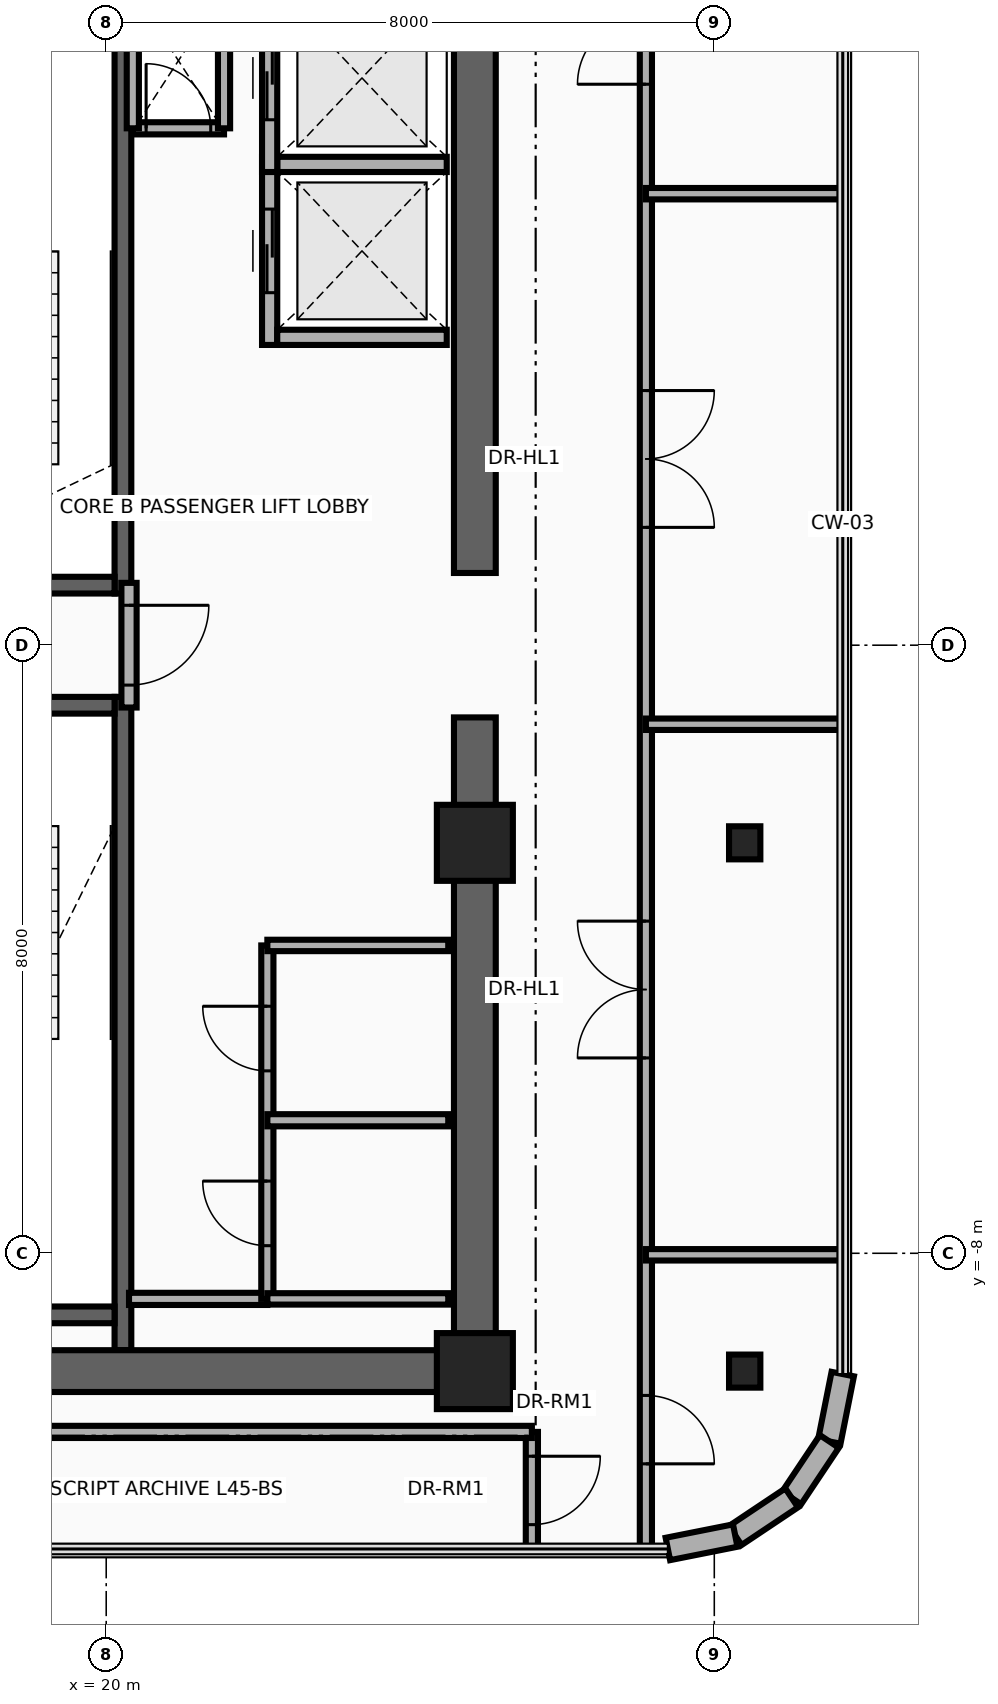
"""IFC4 building model, lengths in metres.
Left out: names, types, materials, properties, quantities, classifications, styles, units other than length and angle.
Written with IfcOpenShell. Run it as: python <this file> out.ifc"""

import sys

from ifc_helpers import new_model, si_unit, direction, frame, frame_2d, origin, origin_2d, place, context, subcontext, project, spatial, rectangle, i_section, extrude, source, transform, mapped, element, fill, save


model = new_model("IFC4")
c1 = context("Model", 3, precision=1e-05, world=origin(), true_north=direction((0.0, 1.0)))
c2 = subcontext(c1, "Body", "Model", "MODEL_VIEW")
j1 = project(units=[si_unit("LENGTHUNIT", "METRE"), si_unit("PLANEANGLEUNIT", "RADIAN")], contexts=[c1])
p1 = place(None, origin())
s1 = spatial("IfcSite", under=j1, at=p1, CompositionType="ELEMENT")
p2 = place(p1, origin())
s2 = spatial("IfcBuilding", under=s1, at=p2, CompositionType="ELEMENT")
p3 = place(p2, frame((0.0, 0.0, 176.55)))
s3 = spatial("IfcBuildingStorey", under=s2, at=p3, CompositionType="ELEMENT", Elevation=176.55)
p4 = place(p3, frame((20.22, 0.68, 0.0), z_axis=(0.0, 0.0, 1.0), x_axis=(0.0, 1.0, 0.0)))
e1 = element("IfcWall", 1, at=p4, inside=s3, PredefinedType="SHEAR", context=c2, shape_type="SweptSolid", body=[
    extrude(rectangle(XDim=8.595, YDim=0.22, at=frame_2d((4.297, 0.0))), origin(), (0.0, 0.0, 1.0), 3.63),
])
p5 = place(p3, frame((17.0, 0.79, 0.0), z_axis=(0.0, 0.0, 1.0), x_axis=(1.0, 0.0, 0.0)))
e2 = element("IfcWall", 2, at=p5, inside=s3, PredefinedType="SHEAR", context=c2, shape_type="SweptSolid", body=[
    extrude(rectangle(XDim=3.11, YDim=0.22, at=frame_2d((1.555, 0.0))), origin(), (0.0, 0.0, 1.0), 3.63),
])
p6 = place(p5, frame((0.95, 0.0, 0.0)))
e3 = element("IfcOpeningElement", 3, at=p6, cuts=e2, PredefinedType="OPENING", context=c2, shape_type="SweptSolid", body=[
    extrude(rectangle(XDim=1.1, YDim=2.15, at=frame_2d((0.55, 1.075))), frame((0.0, 0.125, 0.0), z_axis=(0.0, -1.0, 0.0), x_axis=(1.0, 0.0, 0.0)), (0.0, 0.0, 1.0), 0.25),
])
p7 = place(p3, frame((20.22, -9.275, 0.0), z_axis=(0.0, 0.0, 1.0), x_axis=(0.0, 1.0, 0.0)))
e4 = element("IfcWall", 4, at=p7, inside=s3, PredefinedType="SHEAR", context=c2, shape_type="SweptSolid", body=[
    extrude(rectangle(XDim=8.595, YDim=0.22, at=frame_2d((4.297, 0.0))), origin(), (0.0, 0.0, 1.0), 3.63),
])
p8 = place(p3, frame((17.0, -8.81, 0.0), z_axis=(0.0, 0.0, 1.0), x_axis=(1.0, 0.0, 0.0)))
e5 = element("IfcWall", 5, at=p8, inside=s3, PredefinedType="SHEAR", context=c2, shape_type="SweptSolid", body=[
    extrude(rectangle(XDim=3.11, YDim=0.22, at=frame_2d((1.555, 0.0))), origin(), (0.0, 0.0, 1.0), 3.63),
])
p9 = place(p3, frame((17.0, -0.79, 0.0), z_axis=(0.0, 0.0, 1.0), x_axis=(1.0, 0.0, 0.0)))
e6 = element("IfcWall", 6, at=p9, inside=s3, PredefinedType="SHEAR", context=c2, shape_type="SweptSolid", body=[
    extrude(rectangle(XDim=3.11, YDim=0.22, at=frame_2d((1.555, 0.0))), origin(), (0.0, 0.0, 1.0), 3.63),
])
p10 = place(p9, frame((0.95, 0.0, 0.0)))
e7 = element("IfcOpeningElement", 7, at=p10, cuts=e6, PredefinedType="OPENING", context=c2, shape_type="SweptSolid", body=[
    extrude(rectangle(XDim=1.1, YDim=2.15, at=frame_2d((0.55, 1.075))), frame((0.0, 0.125, 0.0), z_axis=(0.0, -1.0, 0.0), x_axis=(1.0, 0.0, 0.0)), (0.0, 0.0, 1.0), 0.25),
])
for number, where, z_axis, x_axis in (
    (8, (24.85, -9.825, 0.0), (0.0, 0.0, 1.0), (0.0, 1.0, 0.0)),
    (9, (24.85, 0.95, 0.0), (0.0, 0.0, 1.0), (0.0, 1.0, 0.0)),
):
    element("IfcWall", number, at=place(p3, frame(where, z_axis=z_axis, x_axis=x_axis)), inside=s3, PredefinedType="SHEAR", context=c2, shape_type="SweptSolid", body=[
        extrude(rectangle(XDim=8.875, YDim=0.55, at=frame_2d((4.438, 0.0))), origin(), (0.0, 0.0, 1.0), 3.63),
    ])
p11 = place(p3, frame((15.85, -9.55, 0.0), z_axis=(0.0, 0.0, 1.0), x_axis=(1.0, 0.0, 0.0)))
e10 = element("IfcWall", 10, at=p11, inside=s3, PredefinedType="SHEAR", context=c2, shape_type="SweptSolid", body=[
    extrude(rectangle(XDim=9.0, YDim=0.55, at=frame_2d((4.5, 0.0))), origin(), (0.0, 0.0, 1.0), 3.63),
])
m1 = source(origin(), c2, "Body", "SweptSolid", [
    extrude(rectangle(XDim=1.0, YDim=1.0, at=origin_2d()), origin(), (0.0, 0.0, 1.0), 3.95),
])
p12 = place(p3, frame((24.85, -9.55, 0.0), z_axis=(0.0, 0.0, 1.0), x_axis=(1.0, 0.0, 0.0)))
e11 = element("IfcColumn", 11, at=p12, inside=s3, PredefinedType="COLUMN", context=c2, shape_type="MappedRepresentation", body=[
    mapped(m1, transform((0.0, 0.0, 0.0), x_axis=(1.0, 0.0, 0.0), y_axis=(0.0, 1.0, 0.0), z_axis=(0.0, 0.0, 1.0), scale=1.0)),
])
m2 = source(origin(), c2, "Body", "SweptSolid", [
    extrude(i_section(OverallWidth=0.412, OverallDepth=0.435, WebThickness=0.036, FlangeThickness=0.057, at=origin_2d()), origin(), (0.0, 0.0, 1.0), 3.95),
])
p13 = place(p3, frame((28.4, -9.55, 0.0), z_axis=(0.0, 0.0, 1.0), x_axis=(1.0, 0.0, 0.0)))
e12 = element("IfcColumn", 12, at=p13, inside=s3, PredefinedType="COLUMN", context=c2, shape_type="MappedRepresentation", body=[
    mapped(m2, transform((0.0, 0.0, 0.0), x_axis=(1.0, 0.0, 0.0), y_axis=(0.0, 1.0, 0.0), z_axis=(0.0, 0.0, 1.0), scale=1.0)),
])
p14 = place(p3, frame((24.85, -2.6, 0.0), z_axis=(0.0, 0.0, 1.0), x_axis=(1.0, 0.0, 0.0)))
e13 = element("IfcColumn", 13, at=p14, inside=s3, PredefinedType="COLUMN", context=c2, shape_type="MappedRepresentation", body=[
    mapped(m1, transform((0.0, 0.0, 0.0), x_axis=(1.0, 0.0, 0.0), y_axis=(0.0, 1.0, 0.0), z_axis=(0.0, 0.0, 1.0), scale=1.0)),
])
p15 = place(p3, frame((28.4, -2.6, 0.0), z_axis=(0.0, 0.0, 1.0), x_axis=(1.0, 0.0, 0.0)))
e14 = element("IfcColumn", 14, at=p15, inside=s3, PredefinedType="COLUMN", context=c2, shape_type="MappedRepresentation", body=[
    mapped(m2, transform((0.0, 0.0, 0.0), x_axis=(1.0, 0.0, 0.0), y_axis=(0.0, 1.0, 0.0), z_axis=(0.0, 0.0, 1.0), scale=1.0)),
])
p16 = place(p3, frame((29.69, -9.589, 0.0), z_axis=(0.0, 0.0, 1.0), x_axis=(-0.195025152871, -0.980798241101, 0.0)))
e15 = element("IfcWall", 15, at=p16, inside=s3, PredefinedType="SOLIDWALL", context=c2, shape_type="SweptSolid", body=[
    extrude(rectangle(XDim=0.904, YDim=0.3, at=frame_2d((0.452, 0.0))), origin(), (0.0, 0.0, 1.0), 3.63),
])
p17 = place(p3, frame((29.514, -10.476, 0.0), z_axis=(0.0, 0.0, 1.0), x_axis=(-0.555520488502, -0.831502848374, 0.0)))
e16 = element("IfcWall", 16, at=p17, inside=s3, PredefinedType="SOLIDWALL", context=c2, shape_type="SweptSolid", body=[
    extrude(rectangle(XDim=0.893, YDim=0.3, at=frame_2d((0.446, 0.0))), origin(), (0.0, 0.0, 1.0), 3.63),
])
p18 = place(p3, frame((29.018, -11.218, 0.0), z_axis=(0.0, 0.0, 1.0), x_axis=(-0.83158722889, -0.555394167009, 0.0)))
e17 = element("IfcWall", 17, at=p18, inside=s3, PredefinedType="SOLIDWALL", context=c2, shape_type="SweptSolid", body=[
    extrude(rectangle(XDim=0.893, YDim=0.3, at=frame_2d((0.446, 0.0))), origin(), (0.0, 0.0, 1.0), 3.63),
])
p19 = place(p3, frame((28.275, -11.714, 0.0), z_axis=(0.0, 0.0, 1.0), x_axis=(-0.980787963133, -0.19507683454, 0.0)))
e18 = element("IfcWall", 18, at=p19, inside=s3, PredefinedType="SOLIDWALL", context=c2, shape_type="SweptSolid", body=[
    extrude(rectangle(XDim=0.904, YDim=0.3, at=frame_2d((0.452, 0.0))), origin(), (0.0, 0.0, 1.0), 3.63),
])
p20 = place(p3, frame((22.15, 3.95, 0.0), z_axis=(0.0, 0.0, 1.0), x_axis=(0.0, 1.0, 0.0)))
e19 = element("IfcWall", 19, at=p20, inside=s3, PredefinedType="MOVABLE", context=c2, shape_type="SweptSolid", body=[
    extrude(rectangle(XDim=2.475, YDim=0.2, at=frame_2d((1.238, 0.0))), origin(), (0.0, 0.0, 1.0), 3.63),
])
p21 = place(p20, frame((0.688, 0.0, 0.0)))
e20 = element("IfcOpeningElement", 20, at=p21, cuts=e19, PredefinedType="OPENING", context=c2, shape_type="SweptSolid", body=[
    extrude(rectangle(XDim=1.1, YDim=2.1, at=frame_2d((0.55, 1.05))), frame((0.0, 0.115, 0.0), z_axis=(0.0, -1.0, 0.0), x_axis=(1.0, 0.0, 0.0)), (0.0, 0.0, 1.0), 0.23),
])
for number, where, z_axis, x_axis in (
    (21, (22.25, 4.05, 0.0), (0.0, 0.0, 1.0), (1.0, 0.0, 0.0)),
    (22, (22.25, 6.325, 0.0), (0.0, 0.0, 1.0), (1.0, 0.0, 0.0)),
):
    element("IfcWall", number, at=place(p3, frame(where, z_axis=z_axis, x_axis=x_axis)), inside=s3, PredefinedType="MOVABLE", context=c2, shape_type="SweptSolid", body=[
        extrude(rectangle(XDim=2.23, YDim=0.2, at=frame_2d((1.115, 0.0))), origin(), (0.0, 0.0, 1.0), 3.63),
    ])
p22 = place(p3, frame((22.15, 6.225, 0.0), z_axis=(0.0, 0.0, 1.0), x_axis=(0.0, 1.0, 0.0)))
e23 = element("IfcWall", 23, at=p22, inside=s3, PredefinedType="MOVABLE", context=c2, shape_type="SweptSolid", body=[
    extrude(rectangle(XDim=2.475, YDim=0.2, at=frame_2d((1.237, 0.0))), origin(), (0.0, 0.0, 1.0), 3.63),
])
p23 = place(p22, frame((0.688, 0.0, 0.0)))
e24 = element("IfcOpeningElement", 24, at=p23, cuts=e23, PredefinedType="OPENING", context=c2, shape_type="SweptSolid", body=[
    extrude(rectangle(XDim=1.1, YDim=2.1, at=frame_2d((0.55, 1.05))), frame((0.0, 0.115, 0.0), z_axis=(0.0, -1.0, 0.0), x_axis=(1.0, 0.0, 0.0)), (0.0, 0.0, 1.0), 0.23),
])
p24 = place(p3, frame((20.3, -0.82, 0.0), z_axis=(0.0, 0.0, 1.0), x_axis=(0.0, 1.0, 0.0)))
e25 = element("IfcWall", 25, at=p24, inside=s3, PredefinedType="PARTITIONING", context=c2, shape_type="SweptSolid", body=[
    extrude(rectangle(XDim=1.64, YDim=0.2, at=frame_2d((0.82, 0.0))), origin(), (0.0, 0.0, 1.0), 3.63),
])
p25 = place(p24, frame((0.295, 0.0, 0.0)))
e26 = element("IfcOpeningElement", 26, at=p25, cuts=e25, PredefinedType="OPENING", context=c2, shape_type="SweptSolid", body=[
    extrude(rectangle(XDim=1.05, YDim=2.15, at=frame_2d((0.525, 1.075))), frame((0.0, 0.115, 0.0), z_axis=(0.0, -1.0, 0.0), x_axis=(1.0, 0.0, 0.0)), (0.0, 0.0, 1.0), 0.23),
])
p26 = place(p3, frame((20.35, 6.8, 0.0), z_axis=(0.0, 0.0, 1.0), x_axis=(1.0, 0.0, 0.0)))
e27 = element("IfcWall", 27, at=p26, inside=s3, PredefinedType="PARTITIONING", context=c2, shape_type="SweptSolid", body=[
    extrude(rectangle(XDim=1.2, YDim=0.16, at=frame_2d((0.6, 0.0))), origin(), (0.0, 0.0, 1.0), 3.63),
])
p27 = place(p26, frame((0.175, 0.0, 0.0)))
e28 = element("IfcOpeningElement", 28, at=p27, cuts=e27, PredefinedType="OPENING", context=c2, shape_type="SweptSolid", body=[
    extrude(rectangle(XDim=0.85, YDim=2.05, at=frame_2d((0.425, 1.025))), frame((0.0, 0.095, 0.0), z_axis=(0.0, -1.0, 0.0), x_axis=(1.0, 0.0, 0.0)), (0.0, 0.0, 1.0), 0.19),
])
for number, where, z_axis, x_axis in (
    (29, (21.55, 6.8, 0.0), (0.0, 0.0, 1.0), (0.0, 1.0, 0.0)),
    (30, (20.35, 6.8, 0.0), (0.0, 0.0, 1.0), (0.0, 1.0, 0.0)),
):
    element("IfcWall", number, at=place(p3, frame(where, z_axis=z_axis, x_axis=x_axis)), inside=s3, PredefinedType="PARTITIONING", context=c2, shape_type="SweptSolid", body=[
        extrude(rectangle(XDim=1.8, YDim=0.16, at=frame_2d((0.9, 0.0))), origin(), (0.0, 0.0, 1.0), 3.63),
    ])
p28 = place(p3, frame((20.3, -8.6, 0.0), z_axis=(0.0, 0.0, 1.0), x_axis=(1.0, 0.0, 0.0)))
e31 = element("IfcWall", 31, at=p28, inside=s3, PredefinedType="PARTITIONING", context=c2, shape_type="SweptSolid", body=[
    extrude(rectangle(XDim=1.82, YDim=0.16, at=frame_2d((0.91, 0.0))), origin(), (0.0, 0.0, 1.0), 3.63),
])
p29 = place(p3, frame((22.12, -8.6, 0.0), z_axis=(0.0, 0.0, 1.0), x_axis=(0.0, 1.0, 0.0)))
e32 = element("IfcWall", 32, at=p29, inside=s3, PredefinedType="PARTITIONING", context=c2, shape_type="SweptSolid", body=[
    extrude(rectangle(XDim=4.65, YDim=0.16, at=frame_2d((2.325, 0.0))), origin(), (0.0, 0.0, 1.0), 3.63),
])
p30 = place(p29, frame((0.7, 0.0, 0.0)))
e33 = element("IfcOpeningElement", 33, at=p30, cuts=e32, PredefinedType="OPENING", context=c2, shape_type="SweptSolid", body=[
    extrude(rectangle(XDim=0.85, YDim=2.05, at=frame_2d((0.425, 1.025))), frame((0.0, 0.095, 0.0), z_axis=(0.0, -1.0, 0.0), x_axis=(1.0, 0.0, 0.0)), (0.0, 0.0, 1.0), 0.19),
])
p31 = place(p29, frame((3.0, 0.0, 0.0)))
e34 = element("IfcOpeningElement", 34, at=p31, cuts=e32, PredefinedType="OPENING", context=c2, shape_type="SweptSolid", body=[
    extrude(rectangle(XDim=0.85, YDim=2.05, at=frame_2d((0.425, 1.025))), frame((0.0, 0.095, 0.0), z_axis=(0.0, -1.0, 0.0), x_axis=(1.0, 0.0, 0.0)), (0.0, 0.0, 1.0), 0.19),
])
for number, where, z_axis, x_axis in (
    (35, (22.12, -3.95, 0.0), (0.0, 0.0, 1.0), (1.0, 0.0, 0.0)),
    (36, (22.12, -8.6, 0.0), (0.0, 0.0, 1.0), (1.0, 0.0, 0.0)),
):
    element("IfcWall", number, at=place(p3, frame(where, z_axis=z_axis, x_axis=x_axis)), inside=s3, PredefinedType="PARTITIONING", context=c2, shape_type="SweptSolid", body=[
        extrude(rectangle(XDim=2.38, YDim=0.15, at=frame_2d((1.19, 0.0))), origin(), (0.0, 0.0, 1.0), 3.63),
    ])
p32 = place(p3, frame((22.12, -6.25, 0.0), z_axis=(0.0, 0.0, 1.0), x_axis=(1.0, 0.0, 0.0)))
e37 = element("IfcWall", 37, at=p32, inside=s3, PredefinedType="PARTITIONING", context=c2, shape_type="SweptSolid", body=[
    extrude(rectangle(XDim=2.38, YDim=0.16, at=frame_2d((1.19, 0.0))), origin(), (0.0, 0.0, 1.0), 3.63),
])
p33 = place(p3, frame((25.6, -11.89, 0.0), z_axis=(0.0, 0.0, 1.0), x_axis=(0.0, 1.0, 0.0)))
e38 = element("IfcWall", 38, at=p33, inside=s3, PredefinedType="PARTITIONING", context=c2, shape_type="SweptSolid", body=[
    extrude(rectangle(XDim=1.54, YDim=0.16, at=frame_2d((0.77, 0.0))), origin(), (0.0, 0.0, 1.0), 3.63),
])
p34 = place(p33, frame((0.32, 0.0, 0.0)))
e39 = element("IfcOpeningElement", 39, at=p34, cuts=e38, PredefinedType="OPENING", context=c2, shape_type="SweptSolid", body=[
    extrude(rectangle(XDim=0.9, YDim=2.1, at=frame_2d((0.45, 1.05))), frame((0.0, 0.095, 0.0), z_axis=(0.0, -1.0, 0.0), x_axis=(1.0, 0.0, 0.0)), (0.0, 0.0, 1.0), 0.19),
])
p35 = place(p3, frame((13.889, -10.35, 0.0), z_axis=(0.0, 0.0, 1.0), x_axis=(1.0, 0.0, 0.0)))
e40 = element("IfcWall", 40, at=p35, inside=s3, PredefinedType="PARTITIONING", context=c2, shape_type="SweptSolid", body=[
    extrude(rectangle(XDim=11.711, YDim=0.16, at=frame_2d((5.855, 0.0))), origin(), (0.0, 0.0, 1.0), 3.63),
])
p36 = place(p3, frame((27.1, -11.89, 0.0), z_axis=(0.0, 0.0, 1.0), x_axis=(0.0, 1.0, 0.0)))
e41 = element("IfcWall", 41, at=p36, inside=s3, PredefinedType="PARTITIONING", context=c2, shape_type="SweptSolid", body=[
    extrude(rectangle(XDim=24.81, YDim=0.16, at=frame_2d((12.405, 0.0))), origin(), (0.0, 0.0, 1.0), 2.665),
])
p37 = place(p36, frame((1.12, 0.0, 0.0)))
e42 = element("IfcOpeningElement", 42, at=p37, cuts=e41, PredefinedType="OPENING", context=c2, shape_type="SweptSolid", body=[
    extrude(rectangle(XDim=0.9, YDim=2.1, at=frame_2d((0.45, 1.05))), frame((0.0, 0.095, 0.0), z_axis=(0.0, -1.0, 0.0), x_axis=(1.0, 0.0, 0.0)), (0.0, 0.0, 1.0), 0.19),
])
p38 = place(p36, frame((6.46, 0.0, 0.0)))
e43 = element("IfcOpeningElement", 43, at=p38, cuts=e41, PredefinedType="OPENING", context=c2, shape_type="SweptSolid", body=[
    extrude(rectangle(XDim=1.8, YDim=2.15, at=frame_2d((0.9, 1.075))), frame((0.0, 0.095, 0.0), z_axis=(0.0, -1.0, 0.0), x_axis=(1.0, 0.0, 0.0)), (0.0, 0.0, 1.0), 0.19),
])
p39 = place(p36, frame((13.44, 0.0, 0.0)))
e44 = element("IfcOpeningElement", 44, at=p39, cuts=e41, PredefinedType="OPENING", context=c2, shape_type="SweptSolid", body=[
    extrude(rectangle(XDim=1.8, YDim=2.15, at=frame_2d((0.9, 1.075))), frame((0.0, 0.095, 0.0), z_axis=(0.0, -1.0, 0.0), x_axis=(1.0, 0.0, 0.0)), (0.0, 0.0, 1.0), 0.19),
])
p40 = place(p36, frame((19.27, 0.0, 0.0)))
e45 = element("IfcOpeningElement", 45, at=p40, cuts=e41, PredefinedType="OPENING", context=c2, shape_type="SweptSolid", body=[
    extrude(rectangle(XDim=1.8, YDim=2.15, at=frame_2d((0.9, 1.075))), frame((0.0, 0.095, 0.0), z_axis=(0.0, -1.0, 0.0), x_axis=(1.0, 0.0, 0.0)), (0.0, 0.0, 1.0), 0.19),
])
for number, where, z_axis, x_axis in (
    (46, (27.1, -8.02, 0.0), (0.0, 0.0, 1.0), (1.0, 0.0, 0.0)),
    (47, (27.1, -1.04, 0.0), (0.0, 0.0, 1.0), (1.0, 0.0, 0.0)),
    (48, (27.1, 5.94, 0.0), (0.0, 0.0, 1.0), (1.0, 0.0, 0.0)),
):
    element("IfcWall", number, at=place(p3, frame(where, z_axis=z_axis, x_axis=x_axis)), inside=s3, PredefinedType="PARTITIONING", context=c2, shape_type="SweptSolid", body=[
        extrude(rectangle(XDim=2.59, YDim=0.15, at=frame_2d((1.295, 0.0))), origin(), (0.0, 0.0, 1.0), 3.076),
    ])
p41 = place(p21, origin())
e49 = element("IfcDoor", 49, at=p41, inside=s3, OperationType="DOUBLE_DOOR_SLIDING", PredefinedType="DOOR", context=c2, shape_type="SweptSolid", body=[
    extrude(rectangle(XDim=1.1, YDim=2.1, at=frame_2d((0.55, 1.05))), frame((0.0, 0.025, 0.0), z_axis=(0.0, -1.0, 0.0), x_axis=(1.0, 0.0, 0.0)), (0.0, 0.0, 1.0), 0.05),
])
fill(e20, e49)
p42 = place(p23, origin())
e50 = element("IfcDoor", 50, at=p42, inside=s3, OperationType="DOUBLE_DOOR_SLIDING", PredefinedType="DOOR", context=c2, shape_type="SweptSolid", body=[
    extrude(rectangle(XDim=1.1, YDim=2.1, at=frame_2d((0.55, 1.05))), frame((0.0, 0.025, 0.0), z_axis=(0.0, -1.0, 0.0), x_axis=(1.0, 0.0, 0.0)), (0.0, 0.0, 1.0), 0.05),
])
fill(e24, e50)
p43 = place(p25, frame((1.05, 0.0, 0.0), z_axis=(0.0, 0.0, 1.0), x_axis=(-1.0, 0.0, 0.0)))
e51 = element("IfcDoor", 51, at=p43, inside=s3, OperationType="SINGLE_SWING_LEFT", PredefinedType="DOOR", context=c2, shape_type="SweptSolid", body=[
    extrude(rectangle(XDim=1.05, YDim=2.15, at=frame_2d((0.525, 1.075))), frame((0.0, 0.025, 0.0), z_axis=(0.0, -1.0, 0.0), x_axis=(1.0, 0.0, 0.0)), (0.0, 0.0, 1.0), 0.05),
])
fill(e26, e51)
p44 = place(p27, origin())
e52 = element("IfcDoor", 52, at=p44, inside=s3, OperationType="SINGLE_SWING_RIGHT", PredefinedType="DOOR", context=c2, shape_type="SweptSolid", body=[
    extrude(rectangle(XDim=0.85, YDim=2.05, at=frame_2d((0.425, 1.025))), frame((0.0, 0.025, 0.0), z_axis=(0.0, -1.0, 0.0), x_axis=(1.0, 0.0, 0.0)), (0.0, 0.0, 1.0), 0.05),
])
fill(e28, e52)
p45 = place(p30, origin())
e53 = element("IfcDoor", 53, at=p45, inside=s3, OperationType="SINGLE_SWING_LEFT", PredefinedType="DOOR", context=c2, shape_type="SweptSolid", body=[
    extrude(rectangle(XDim=0.85, YDim=2.05, at=frame_2d((0.425, 1.025))), frame((0.0, 0.025, 0.0), z_axis=(0.0, -1.0, 0.0), x_axis=(1.0, 0.0, 0.0)), (0.0, 0.0, 1.0), 0.05),
])
fill(e33, e53)
p46 = place(p31, origin())
e54 = element("IfcDoor", 54, at=p46, inside=s3, OperationType="SINGLE_SWING_RIGHT", PredefinedType="DOOR", context=c2, shape_type="SweptSolid", body=[
    extrude(rectangle(XDim=0.85, YDim=2.05, at=frame_2d((0.425, 1.025))), frame((0.0, 0.025, 0.0), z_axis=(0.0, -1.0, 0.0), x_axis=(1.0, 0.0, 0.0)), (0.0, 0.0, 1.0), 0.05),
])
fill(e34, e54)
p47 = place(p34, frame((0.9, 0.0, 0.0), z_axis=(0.0, 0.0, 1.0), x_axis=(-1.0, 0.0, 0.0)))
e55 = element("IfcDoor", 55, at=p47, inside=s3, OperationType="SINGLE_SWING_LEFT", PredefinedType="DOOR", context=c2, shape_type="SweptSolid", body=[
    extrude(rectangle(XDim=0.9, YDim=2.1, at=frame_2d((0.45, 1.05))), frame((0.0, 0.025, 0.0), z_axis=(0.0, -1.0, 0.0), x_axis=(1.0, 0.0, 0.0)), (0.0, 0.0, 1.0), 0.05),
])
fill(e39, e55)
p48 = place(p37, frame((0.9, 0.0, 0.0), z_axis=(0.0, 0.0, 1.0), x_axis=(-1.0, 0.0, 0.0)))
e56 = element("IfcDoor", 56, at=p48, inside=s3, OperationType="SINGLE_SWING_LEFT", PredefinedType="DOOR", context=c2, shape_type="SweptSolid", body=[
    extrude(rectangle(XDim=0.9, YDim=2.1, at=frame_2d((0.45, 1.05))), frame((0.0, 0.025, 0.0), z_axis=(0.0, -1.0, 0.0), x_axis=(1.0, 0.0, 0.0)), (0.0, 0.0, 1.0), 0.05),
])
fill(e42, e56)
p49 = place(p38, origin())
e57 = element("IfcDoor", 57, at=p49, inside=s3, OperationType="DOUBLE_DOOR_SINGLE_SWING", PredefinedType="DOOR", context=c2, shape_type="SweptSolid", body=[
    extrude(rectangle(XDim=1.8, YDim=2.15, at=frame_2d((0.9, 1.075))), frame((0.0, 0.025, 0.0), z_axis=(0.0, -1.0, 0.0), x_axis=(1.0, 0.0, 0.0)), (0.0, 0.0, 1.0), 0.05),
])
fill(e43, e57)
p50 = place(p39, frame((1.8, 0.0, 0.0), z_axis=(0.0, 0.0, 1.0), x_axis=(-1.0, 0.0, 0.0)))
e58 = element("IfcDoor", 58, at=p50, inside=s3, OperationType="DOUBLE_DOOR_SINGLE_SWING", PredefinedType="DOOR", context=c2, shape_type="SweptSolid", body=[
    extrude(rectangle(XDim=1.8, YDim=2.15, at=frame_2d((0.9, 1.075))), frame((0.0, 0.025, 0.0), z_axis=(0.0, -1.0, 0.0), x_axis=(1.0, 0.0, 0.0)), (0.0, 0.0, 1.0), 0.05),
])
fill(e44, e58)
p51 = place(p40, origin())
e59 = element("IfcDoor", 59, at=p51, inside=s3, OperationType="DOUBLE_DOOR_SINGLE_SWING", PredefinedType="DOOR", context=c2, shape_type="SweptSolid", body=[
    extrude(rectangle(XDim=1.8, YDim=2.15, at=frame_2d((0.9, 1.075))), frame((0.0, 0.025, 0.0), z_axis=(0.0, -1.0, 0.0), x_axis=(1.0, 0.0, 0.0)), (0.0, 0.0, 1.0), 0.05),
])
fill(e45, e59)
save(model, sys.argv[1])
